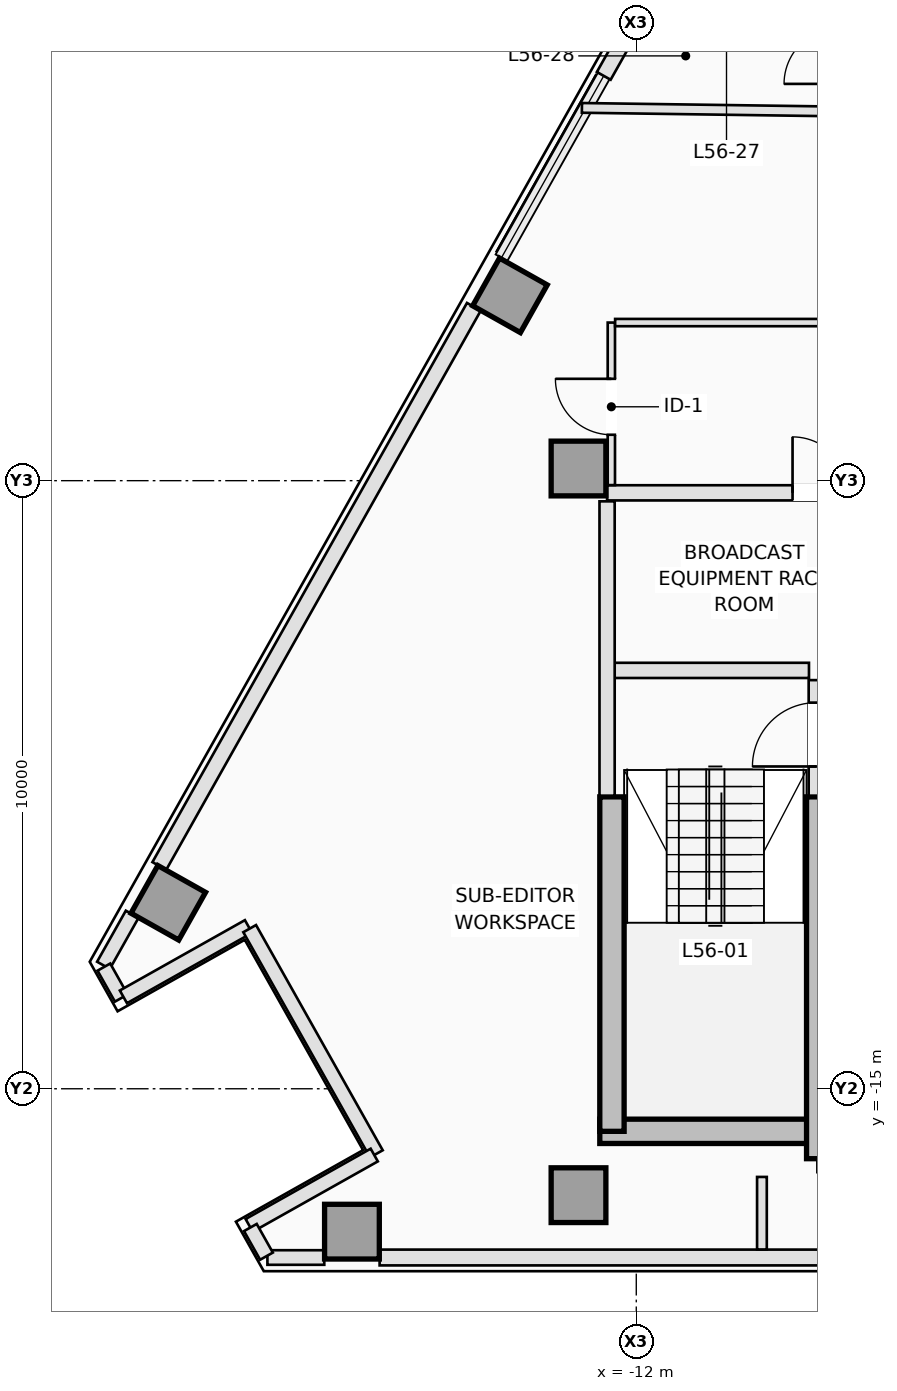
"""IFC4 building model, lengths in metres.
Left out: names, types, materials, properties, quantities, classifications, styles, units other than length and angle.
Written with IfcOpenShell. Run it as: python <this file> out.ifc"""

import sys

from ifc_helpers import new_model, si_unit, direction, frame, frame_2d, origin, origin_2d, place, context, subcontext, project, spatial, rectangle, extrude, element, fill, save


model = new_model("IFC4")
c1 = context("Model", 3, precision=1e-05, world=origin(), true_north=direction((0.0, 1.0)))
c2 = subcontext(c1, "Body", "Model", "MODEL_VIEW")
j1 = project(units=[si_unit("LENGTHUNIT", "METRE"), si_unit("PLANEANGLEUNIT", "RADIAN")], contexts=[c1])
p1 = place(None, origin())
s1 = spatial("IfcSite", under=j1, at=p1, CompositionType="ELEMENT")
p2 = place(p1, origin())
s2 = spatial("IfcBuilding", under=s1, at=p2, CompositionType="ELEMENT")
p3 = place(p2, frame((0.0, 0.0, 204.4)))
s3 = spatial("IfcBuildingStorey", under=s2, at=p3, CompositionType="ELEMENT", Elevation=204.4)
p4 = place(p3, frame((-12.6, -15.7, 0.0), z_axis=(0.0, 0.0, 1.0), x_axis=(1.0, 0.0, 0.0)))
e1 = element("IfcWall", 1, at=p4, inside=s3, PredefinedType="SHEAR", context=c2, shape_type="SweptSolid", body=[
    extrude(rectangle(XDim=3.8, YDim=0.4, at=frame_2d((1.9, 0.0))), origin(), (0.0, 0.0, 1.0), 3.5),
])
p5 = place(p3, frame((-12.4, -15.7, 0.0), z_axis=(0.0, 0.0, 1.0), x_axis=(0.0, 1.0, 0.0)))
e2 = element("IfcWall", 2, at=p5, inside=s3, PredefinedType="SHEAR", context=c2, shape_type="SweptSolid", body=[
    extrude(rectangle(XDim=5.5, YDim=0.4, at=frame_2d((2.75, 0.0))), origin(), (0.0, 0.0, 1.0), 3.5),
])
p6 = place(p3, frame((-9.0, -16.15, 0.0), z_axis=(0.0, 0.0, 1.0), x_axis=(0.0, 1.0, 0.0)))
e3 = element("IfcWall", 3, at=p6, inside=s3, PredefinedType="SHEAR", context=c2, shape_type="SweptSolid", body=[
    extrude(rectangle(XDim=5.95, YDim=0.4, at=frame_2d((2.975, 0.0))), origin(), (0.0, 0.0, 1.0), 3.5),
])
for number, where, z_axis, x_axis in (
    (4, (-12.95, -16.75, 0.0), (0.0, 0.0, 1.0), (1.0, 0.0, 0.0)),
    (5, (-12.95, -4.8, 0.0), (0.0, 0.0, 1.0), (1.0, 0.0, 0.0)),
    (6, (-16.676, -17.35, 0.0), (0.0, 0.0, 1.0), (0.0, 1.0, 0.0)),
    (7, (-14.077, -1.952, 0.0), (0.0, 0.0, 1.0), (-0.872, 0.49, 0.0)),
    (8, (-19.697, -11.942, 0.0), (0.0, 0.0, 1.0), (-0.872, 0.49, 0.0)),
):
    element("IfcColumn", number, at=place(p3, frame(where, z_axis=z_axis, x_axis=x_axis)), inside=s3, PredefinedType="COLUMN", context=c2, shape_type="SweptSolid", body=[
        extrude(rectangle(XDim=0.9, YDim=0.9, at=origin_2d()), origin(), (0.0, 0.0, 1.0), 3.5),
    ])
p7 = place(p3, frame((-17.131, -17.775, 0.0), z_axis=(0.0, 0.0, 1.0), x_axis=(-1.0, 0.0, 0.0)))
e9 = element("IfcWall", 9, at=p7, inside=s3, PredefinedType="STANDARD", context=c2, shape_type="SweptSolid", body=[
    extrude(rectangle(XDim=0.935, YDim=0.24, at=frame_2d((0.468, 0.0))), origin(), (0.0, 0.0, 1.0), 3.25),
])
p8 = place(p3, frame((-5.893, -17.775, 0.0), z_axis=(0.0, 0.0, 1.0), x_axis=(-1.0, 0.0, 0.0)))
e10 = element("IfcWall", 10, at=p8, inside=s3, PredefinedType="STANDARD", context=c2, shape_type="SweptSolid", body=[
    extrude(rectangle(XDim=10.328, YDim=0.26, at=frame_2d((5.164, 0.0))), origin(), (0.0, 0.0, 1.0), 3.25),
])
p9 = place(p3, frame((-20.762, -12.97, 0.0), z_axis=(0.0, 0.0, 1.0), x_axis=(0.490345412687, 0.87152818443, 0.0)))
e11 = element("IfcWall", 11, at=p9, inside=s3, PredefinedType="STANDARD", context=c2, shape_type="SweptSolid", body=[
    extrude(rectangle(XDim=0.964, YDim=0.24, at=frame_2d((0.482, 0.0))), origin(), (0.0, 0.0, 1.0), 3.25),
])
p10 = place(p3, frame((-19.844, -11.337, 0.0), z_axis=(0.0, 0.0, 1.0), x_axis=(0.490246958575, 0.871583570066, 0.0)))
e12 = element("IfcWall", 12, at=p10, inside=s3, PredefinedType="STANDARD", context=c2, shape_type="SweptSolid", body=[
    extrude(rectangle(XDim=10.552, YDim=0.26, at=frame_2d((5.276, 0.0))), origin(), (0.0, 0.0, 1.0), 3.25),
])
p11 = place(p3, frame((-12.535, 1.657, 0.0), z_axis=(0.0, 0.0, 1.0), x_axis=(0.490264765862, 0.871573553611, 0.0)))
e13 = element("IfcWall", 13, at=p11, inside=s3, PredefinedType="STANDARD", context=c2, shape_type="SweptSolid", body=[
    extrude(rectangle(XDim=3.287, YDim=0.26, at=frame_2d((1.644, 0.0))), origin(), (0.0, 0.0, 1.0), 3.25),
])
p12 = place(p3, frame((-20.755, -12.999, 0.0), z_axis=(0.0, 0.0, 1.0), x_axis=(0.490320776404, -0.871542045014, 0.0)))
e14 = element("IfcWall", 14, at=p12, inside=s3, PredefinedType="STANDARD", context=c2, shape_type="SweptSolid", body=[
    extrude(rectangle(XDim=0.584, YDim=0.24, at=frame_2d((0.292, 0.0))), origin(), (0.0, 0.0, 1.0), 3.25),
])
p13 = place(p3, frame((-20.434, -13.489, 0.0), z_axis=(0.0, 0.0, 1.0), x_axis=(0.871578299909, 0.490256327984, 0.0)))
e15 = element("IfcWall", 15, at=p13, inside=s3, PredefinedType="STANDARD", context=c2, shape_type="SweptSolid", body=[
    extrude(rectangle(XDim=2.36, YDim=0.24, at=frame_2d((1.18, 0.0))), origin(), (0.0, 0.0, 1.0), 3.25),
])
p14 = place(p3, frame((-18.358, -12.366, 0.0), z_axis=(0.0, 0.0, 1.0), x_axis=(0.49027487746, -0.871567865706, 0.0)))
e16 = element("IfcWall", 16, at=p14, inside=s3, PredefinedType="STANDARD", context=c2, shape_type="SweptSolid", body=[
    extrude(rectangle(XDim=4.25, YDim=0.24, at=frame_2d((2.125, 0.0))), origin(), (0.0, 0.0, 1.0), 2.722),
])
p15 = place(p3, frame((-16.309, -16.09, 0.0), z_axis=(0.0, 0.0, 1.0), x_axis=(-0.871578299909, -0.490256327984, 0.0)))
e17 = element("IfcWall", 17, at=p15, inside=s3, PredefinedType="STANDARD", context=c2, shape_type="SweptSolid", body=[
    extrude(rectangle(XDim=2.36, YDim=0.24, at=frame_2d((1.18, 0.0))), origin(), (0.0, 0.0, 1.0), 3.25),
])
p16 = place(p3, frame((-18.346, -17.282, 0.0), z_axis=(0.0, 0.0, 1.0), x_axis=(0.49038986747, -0.87150317147, 0.0)))
e18 = element("IfcWall", 18, at=p16, inside=s3, PredefinedType="STANDARD", context=c2, shape_type="SweptSolid", body=[
    extrude(rectangle(XDim=0.541, YDim=0.24, at=frame_2d((0.271, 0.0))), origin(), (0.0, 0.0, 1.0), 3.25),
])
p17 = place(p3, frame((-9.04, -10.18, 0.0), z_axis=(0.0, 0.0, 1.0), x_axis=(0.0, 1.0, 0.0)))
e19 = element("IfcWall", 19, at=p17, inside=s3, PredefinedType="PARTITIONING", context=c2, shape_type="SweptSolid", body=[
    extrude(rectangle(XDim=1.9, YDim=0.25, at=frame_2d((0.95, 0.0))), origin(), (0.0, 0.0, 1.0), 3.25),
])
p18 = place(p17, frame((0.48, 0.0, 0.0)))
e20 = element("IfcOpeningElement", 20, at=p18, cuts=e19, PredefinedType="OPENING", context=c2, shape_type="SweptSolid", body=[
    extrude(rectangle(XDim=1.05, YDim=2.15, at=frame_2d((0.525, 1.075))), frame((0.0, 0.135, 0.0), z_axis=(0.0, -1.0, 0.0), x_axis=(1.0, 0.0, 0.0)), (0.0, 0.0, 1.0), 0.27),
])
p19 = place(p3, frame((-12.38, -8.12, 0.0), z_axis=(0.0, 0.0, 1.0), x_axis=(1.0, 0.0, 0.0)))
e21 = element("IfcWall", 21, at=p19, inside=s3, PredefinedType="PARTITIONING", context=c2, shape_type="SweptSolid", body=[
    extrude(rectangle(XDim=3.22, YDim=0.25, at=frame_2d((1.61, 0.0))), origin(), (0.0, 0.0, 1.0), 3.25),
])
p20 = place(p3, frame((-12.48, -10.18, 0.0), z_axis=(0.0, 0.0, 1.0), x_axis=(0.0, 1.0, 0.0)))
e22 = element("IfcWall", 22, at=p20, inside=s3, PredefinedType="PARTITIONING", context=c2, shape_type="SweptSolid", body=[
    extrude(rectangle(XDim=4.84, YDim=0.25, at=frame_2d((2.42, 0.0))), origin(), (0.0, 0.0, 1.0), 3.25),
])
p21 = place(p3, frame((-12.48, -5.2, 0.0), z_axis=(0.0, 0.0, 1.0), x_axis=(1.0, 0.0, 0.0)))
e23 = element("IfcWall", 23, at=p21, inside=s3, PredefinedType="PARTITIONING", context=c2, shape_type="SweptSolid", body=[
    extrude(rectangle(XDim=8.278, YDim=0.25, at=frame_2d((4.139, 0.0))), origin(), (0.0, 0.0, 1.0), 3.25),
])
p22 = place(p21, frame((3.05, 0.0, 0.0)))
e24 = element("IfcOpeningElement", 24, at=p22, cuts=e23, PredefinedType="OPENING", context=c2, shape_type="SweptSolid", body=[
    extrude(rectangle(XDim=0.92, YDim=2.12, at=frame_2d((0.46, 1.06))), frame((0.0, 0.135, 0.0), z_axis=(0.0, -1.0, 0.0), x_axis=(1.0, 0.0, 0.0)), (0.0, 0.0, 1.0), 0.27),
])
p23 = place(p21, frame((6.15, 0.0, 0.0)))
e25 = element("IfcOpeningElement", 25, at=p23, cuts=e23, PredefinedType="OPENING", context=c2, shape_type="SweptSolid", body=[
    extrude(rectangle(XDim=0.92, YDim=2.12, at=frame_2d((0.46, 1.06))), frame((0.0, 0.135, 0.0), z_axis=(0.0, -1.0, 0.0), x_axis=(1.0, 0.0, 0.0)), (0.0, 0.0, 1.0), 0.27),
])
p24 = place(p3, frame((-12.41, -5.073, 0.0), z_axis=(0.0, 0.0, 1.0), x_axis=(0.0, 1.0, 0.0)))
e26 = element("IfcWall", 26, at=p24, inside=s3, PredefinedType="PARTITIONING", context=c2, shape_type="SweptSolid", body=[
    extrude(rectangle(XDim=2.673, YDim=0.12, at=frame_2d((1.336, 0.0))), origin(), (0.0, 0.0, 1.0), 3.25),
])
p25 = place(p24, frame((0.828, 0.0, 0.0)))
e27 = element("IfcOpeningElement", 27, at=p25, cuts=e26, PredefinedType="OPENING", context=c2, shape_type="SweptSolid", body=[
    extrude(rectangle(XDim=0.92, YDim=2.12, at=frame_2d((0.46, 1.06))), frame((0.0, 0.07, 0.0), z_axis=(0.0, -1.0, 0.0), x_axis=(1.0, 0.0, 0.0)), (0.0, 0.0, 1.0), 0.14),
])
p26 = place(p3, frame((-12.348, -2.4, 0.0), z_axis=(0.0, 0.0, 1.0), x_axis=(1.0, 0.0, 0.0)))
e28 = element("IfcWall", 28, at=p26, inside=s3, PredefinedType="PARTITIONING", context=c2, shape_type="SweptSolid", body=[
    extrude(rectangle(XDim=3.698, YDim=0.12, at=frame_2d((1.849, 0.0))), origin(), (0.0, 0.0, 1.0), 3.25),
])
p27 = place(p3, frame((-8.76, 1.073, 0.0), z_axis=(0.0, 0.0, 1.0), x_axis=(-0.999901237572, 0.014054006646, 0.0)))
e29 = element("IfcWall", 29, at=p27, inside=s3, PredefinedType="PARTITIONING", context=c2, shape_type="SweptSolid", body=[
    extrude(rectangle(XDim=4.135, YDim=0.16, at=frame_2d((2.067, 0.0))), origin(), (0.0, 0.0, 1.0), 3.25),
])
p28 = place(p3, frame((-9.934, -16.45, 0.0), z_axis=(0.0, 0.0, 1.0), x_axis=(0.0, -1.0, 0.0)))
e30 = element("IfcWall", 30, at=p28, inside=s3, PredefinedType="PARTITIONING", context=c2, shape_type="SweptSolid", body=[
    extrude(rectangle(XDim=1.193, YDim=0.16, at=frame_2d((0.597, 0.0))), origin(), (0.0, 0.0, 1.0), 3.25),
])
p29 = place(p18, origin())
e31 = element("IfcDoor", 31, at=p29, inside=s3, OperationType="SINGLE_SWING_LEFT", PredefinedType="DOOR", context=c2, shape_type="SweptSolid", body=[
    extrude(rectangle(XDim=1.05, YDim=2.15, at=frame_2d((0.525, 1.075))), frame((0.0, 0.025, 0.0), z_axis=(0.0, -1.0, 0.0), x_axis=(1.0, 0.0, 0.0)), (0.0, 0.0, 1.0), 0.05),
])
fill(e20, e31)
p30 = place(p22, origin())
e32 = element("IfcDoor", 32, at=p30, inside=s3, OperationType="SINGLE_SWING_LEFT", PredefinedType="DOOR", context=c2, shape_type="SweptSolid", body=[
    extrude(rectangle(XDim=0.92, YDim=2.12, at=frame_2d((0.46, 1.06))), frame((0.0, 0.025, 0.0), z_axis=(0.0, -1.0, 0.0), x_axis=(1.0, 0.0, 0.0)), (0.0, 0.0, 1.0), 0.05),
])
fill(e24, e32)
p31 = place(p25, origin())
e33 = element("IfcDoor", 33, at=p31, inside=s3, OperationType="SINGLE_SWING_RIGHT", PredefinedType="DOOR", context=c2, shape_type="SweptSolid", body=[
    extrude(rectangle(XDim=0.92, YDim=2.12, at=frame_2d((0.46, 1.06))), frame((0.0, 0.025, 0.0), z_axis=(0.0, -1.0, 0.0), x_axis=(1.0, 0.0, 0.0)), (0.0, 0.0, 1.0), 0.05),
])
fill(e27, e33)
save(model, sys.argv[1])
